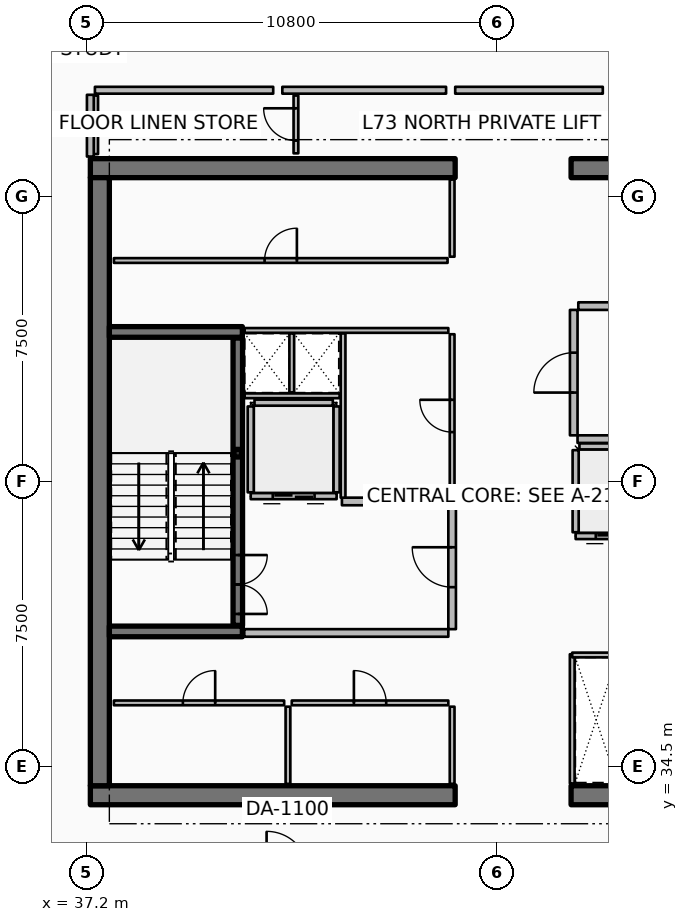
"""IFC4 building model, lengths in metres.
Left out: names, types, materials, properties, quantities, classifications, styles, units other than length and angle.
Written with IfcOpenShell. Run it as: python <this file> out.ifc"""

import sys

from ifc_helpers import new_model, si_unit, direction, frame, frame_2d, origin, origin_2d, place, context, subcontext, project, spatial, rectangle, hollow_rectangle, extrude, element, fill, save


model = new_model("IFC4")
c1 = context("Model", 3, precision=1e-05, world=origin(), true_north=direction((0.0, 1.0)))
c2 = subcontext(c1, "Body", "Model", "MODEL_VIEW")
j1 = project(units=[si_unit("LENGTHUNIT", "METRE"), si_unit("PLANEANGLEUNIT", "RADIAN")], contexts=[c1])
p1 = place(None, origin())
s1 = spatial("IfcSite", under=j1, at=p1, CompositionType="ELEMENT")
p2 = place(p1, origin())
s2 = spatial("IfcBuilding", under=s1, at=p2, CompositionType="ELEMENT")
p3 = place(p2, frame((0.0, 0.0, 290.6)))
s3 = spatial("IfcBuildingStorey", under=s2, at=p3, CompositionType="ELEMENT", Elevation=290.6)
p4 = place(p3, frame((37.3, 33.75, 0.0), z_axis=(0.0, 0.0, 1.0), x_axis=(1.0, 0.0, 0.0)))
e1 = element("IfcWall", 1, at=p4, inside=s3, PredefinedType="SHEAR", context=c2, shape_type="SweptSolid", body=[
    extrude(rectangle(XDim=9.6, YDim=0.5, at=frame_2d((4.8, 0.0))), origin(), (0.0, 0.0, 1.0), 3.85),
])
p5 = place(p3, frame((49.95, 33.75, 0.0), z_axis=(0.0, 0.0, 1.0), x_axis=(1.0, 0.0, 0.0)))
e2 = element("IfcWall", 2, at=p5, inside=s3, PredefinedType="SHEAR", context=c2, shape_type="SweptSolid", body=[
    extrude(rectangle(XDim=9.6, YDim=0.5, at=frame_2d((4.8, 0.0))), origin(), (0.0, 0.0, 1.0), 3.85),
])
p6 = place(p3, frame((37.3, 50.25, 0.0), z_axis=(0.0, 0.0, 1.0), x_axis=(1.0, 0.0, 0.0)))
e3 = element("IfcWall", 3, at=p6, inside=s3, PredefinedType="SHEAR", context=c2, shape_type="SweptSolid", body=[
    extrude(rectangle(XDim=9.6, YDim=0.5, at=frame_2d((4.8, 0.0))), origin(), (0.0, 0.0, 1.0), 3.85),
])
p7 = place(p3, frame((49.95, 50.25, 0.0), z_axis=(0.0, 0.0, 1.0), x_axis=(1.0, 0.0, 0.0)))
e4 = element("IfcWall", 4, at=p7, inside=s3, PredefinedType="SHEAR", context=c2, shape_type="SweptSolid", body=[
    extrude(rectangle(XDim=9.6, YDim=0.5, at=frame_2d((4.8, 0.0))), origin(), (0.0, 0.0, 1.0), 3.85),
])
p8 = place(p3, frame((37.55, 34.0, 0.0), z_axis=(0.0, 0.0, 1.0), x_axis=(0.0, 1.0, 0.0)))
e5 = element("IfcWall", 5, at=p8, inside=s3, PredefinedType="SHEAR", context=c2, shape_type="SweptSolid", body=[
    extrude(rectangle(XDim=16.0, YDim=0.5, at=frame_2d((8.0, 0.0))), origin(), (0.0, 0.0, 1.0), 3.85),
])
for number, where, z_axis, x_axis in (
    (6, (37.8, 38.06, 0.0), (0.0, 0.0, 1.0), (1.0, 0.0, 0.0)),
    (7, (37.8, 45.94, 0.0), (0.0, 0.0, 1.0), (1.0, 0.0, 0.0)),
):
    element("IfcWall", number, at=place(p3, frame(where, z_axis=z_axis, x_axis=x_axis)), inside=s3, PredefinedType="SHEAR", context=c2, shape_type="SweptSolid", body=[
        extrude(rectangle(XDim=3.5, YDim=0.28, at=frame_2d((1.75, 0.0))), origin(), (0.0, 0.0, 1.0), 3.85),
    ])
p9 = place(p3, frame((41.18, 42.75, 0.0), z_axis=(0.0, 0.0, 1.0), x_axis=(1.0, 0.0, 0.0)))
e8 = element("IfcColumn", 8, at=p9, inside=s3, PredefinedType="COLUMN", context=c2, shape_type="SweptSolid", body=[
    extrude(hollow_rectangle(XDim=0.2, YDim=0.2, WallThickness=0.01, InnerFilletRadius=0.01, OuterFilletRadius=0.02, at=origin_2d()), origin(), (0.0, 0.0, 1.0), 1.72),
])
p10 = place(p3, frame((41.18, 38.22, 0.0), z_axis=(0.0, 0.0, 1.0), x_axis=(0.0, 1.0, 0.0)))
e9 = element("IfcWall", 9, at=p10, inside=s3, PredefinedType="SOLIDWALL", context=c2, shape_type="SweptSolid", body=[
    extrude(rectangle(XDim=7.56, YDim=0.25, at=frame_2d((3.78, 0.0))), origin(), (0.0, 0.0, 1.0), 3.59),
])
p11 = place(p10, frame((0.3, 0.0, 0.0)))
e10 = element("IfcOpeningElement", 10, at=p11, cuts=e9, PredefinedType="OPENING", context=c2, shape_type="SweptSolid", body=[
    extrude(rectangle(XDim=1.55, YDim=2.15, at=frame_2d((0.775, 1.075))), frame((0.0, 0.135, 0.0), z_axis=(0.0, -1.0, 0.0), x_axis=(1.0, 0.0, 0.0)), (0.0, 0.0, 1.0), 0.27),
])
p12 = place(p3, frame((43.78, 41.62, 0.0), z_axis=(0.0, 0.0, 1.0), x_axis=(-1.0, 0.0, 0.0)))
e11 = element("IfcWall", 11, at=p12, inside=s3, PredefinedType="PARTITIONING", context=c2, shape_type="SweptSolid", body=[
    extrude(rectangle(XDim=2.26, YDim=0.16, at=frame_2d((1.13, 0.0))), origin(), (0.0, 0.0, 1.0), 3.59),
])
p13 = place(p12, frame((0.58, 0.0, 0.0)))
e12 = element("IfcOpeningElement", 12, at=p13, cuts=e11, PredefinedType="OPENING", context=c2, shape_type="SweptSolid", body=[
    extrude(rectangle(XDim=1.1, YDim=2.1, at=frame_2d((0.55, 1.05))), frame((0.0, 0.09, 0.0), z_axis=(0.0, -1.0, 0.0), x_axis=(1.0, 0.0, 0.0)), (0.0, 0.0, 1.0), 0.18),
])
for number, where, z_axis, x_axis in (
    (13, (43.78, 41.72, 0.0), (0.0, 0.0, 1.0), (0.0, 1.0, 0.0)),
    (14, (41.52, 41.72, 0.0), (0.0, 0.0, 1.0), (0.0, 1.0, 0.0)),
):
    element("IfcWall", number, at=place(p3, frame(where, z_axis=z_axis, x_axis=x_axis)), inside=s3, PredefinedType="PARTITIONING", context=c2, shape_type="SweptSolid", body=[
        extrude(rectangle(XDim=2.26, YDim=0.16, at=frame_2d((1.13, 0.0))), origin(), (0.0, 0.0, 1.0), 3.59),
    ])
p14 = place(p3, frame((41.62, 44.08, 0.0), z_axis=(0.0, 0.0, 1.0), x_axis=(1.0, 0.0, 0.0)))
e15 = element("IfcWall", 15, at=p14, inside=s3, PredefinedType="PARTITIONING", context=c2, shape_type="SweptSolid", body=[
    extrude(rectangle(XDim=2.06, YDim=0.16, at=frame_2d((1.03, 0.0))), origin(), (0.0, 0.0, 1.0), 3.59),
])
p15 = place(p3, frame((52.23, 40.57, 0.0), z_axis=(0.0, 0.0, 1.0), x_axis=(-1.0, 0.0, 0.0)))
e16 = element("IfcWall", 16, at=p15, inside=s3, PredefinedType="PARTITIONING", context=c2, shape_type="SweptSolid", body=[
    extrude(rectangle(XDim=2.16, YDim=0.16, at=frame_2d((1.08, 0.0))), origin(), (0.0, 0.0, 1.0), 3.59),
])
p16 = place(p15, frame((0.53, 0.0, 0.0)))
e17 = element("IfcOpeningElement", 17, at=p16, cuts=e16, PredefinedType="OPENING", context=c2, shape_type="SweptSolid", body=[
    extrude(rectangle(XDim=1.1, YDim=2.1, at=frame_2d((0.55, 1.05))), frame((0.0, 0.09, 0.0), z_axis=(0.0, -1.0, 0.0), x_axis=(1.0, 0.0, 0.0)), (0.0, 0.0, 1.0), 0.18),
])
p17 = place(p3, frame((50.07, 40.67, 0.0), z_axis=(0.0, 0.0, 1.0), x_axis=(0.0, 1.0, 0.0)))
e18 = element("IfcWall", 18, at=p17, inside=s3, PredefinedType="PARTITIONING", context=c2, shape_type="SweptSolid", body=[
    extrude(rectangle(XDim=2.16, YDim=0.16, at=frame_2d((1.08, 0.0))), origin(), (0.0, 0.0, 1.0), 3.59),
])
p18 = place(p3, frame((50.17, 42.93, 0.0), z_axis=(0.0, 0.0, 1.0), x_axis=(1.0, 0.0, 0.0)))
e19 = element("IfcWall", 19, at=p18, inside=s3, PredefinedType="PARTITIONING", context=c2, shape_type="SweptSolid", body=[
    extrude(rectangle(XDim=1.96, YDim=0.16, at=frame_2d((0.98, 0.0))), origin(), (0.0, 0.0, 1.0), 3.59),
])
for number, where, z_axis, x_axis in (
    (20, (46.82, 34.05, 0.0), (0.0, 0.0, 1.0), (0.0, 1.0, 0.0)),
    (21, (42.5, 34.05, 0.0), (0.0, 0.0, 1.0), (0.0, 1.0, 0.0)),
):
    element("IfcWall", number, at=place(p3, frame(where, z_axis=z_axis, x_axis=x_axis)), inside=s3, PredefinedType="PARTITIONING", context=c2, shape_type="SweptSolid", body=[
        extrude(rectangle(XDim=2.03, YDim=0.125, at=frame_2d((1.015, 0.0))), origin(), (0.0, 0.0, 1.0), 3.03),
    ])
p19 = place(p3, frame((37.92, 36.18, 0.0), z_axis=(0.0, 0.0, 1.0), x_axis=(1.0, 0.0, 0.0)))
e22 = element("IfcWall", 22, at=p19, inside=s3, PredefinedType="PARTITIONING", context=c2, shape_type="SweptSolid", body=[
    extrude(rectangle(XDim=4.48, YDim=0.125, at=frame_2d((2.24, 0.0))), origin(), (0.0, 0.0, 1.0), 3.03),
])
p20 = place(p19, frame((1.815, 0.0, 0.0)))
e23 = element("IfcOpeningElement", 23, at=p20, cuts=e22, PredefinedType="OPENING", context=c2, shape_type="SweptSolid", body=[
    extrude(rectangle(XDim=0.85, YDim=2.06, at=frame_2d((0.425, 1.03))), frame((0.0, 0.073, 0.0), z_axis=(0.0, -1.0, 0.0), x_axis=(1.0, 0.0, 0.0)), (0.0, 0.0, 1.0), 0.145),
])
p21 = place(p3, frame((42.6, 36.18, 0.0), z_axis=(0.0, 0.0, 1.0), x_axis=(1.0, 0.0, 0.0)))
e24 = element("IfcWall", 24, at=p21, inside=s3, PredefinedType="PARTITIONING", context=c2, shape_type="SweptSolid", body=[
    extrude(rectangle(XDim=4.12, YDim=0.125, at=frame_2d((2.06, 0.0))), origin(), (0.0, 0.0, 1.0), 3.03),
])
p22 = place(p21, frame((1.635, 0.0, 0.0)))
e25 = element("IfcOpeningElement", 25, at=p22, cuts=e24, PredefinedType="OPENING", context=c2, shape_type="SweptSolid", body=[
    extrude(rectangle(XDim=0.85, YDim=2.06, at=frame_2d((0.425, 1.03))), frame((0.0, 0.073, 0.0), z_axis=(0.0, -1.0, 0.0), x_axis=(1.0, 0.0, 0.0)), (0.0, 0.0, 1.0), 0.145),
])
p23 = place(p3, frame((46.82, 47.92, 0.0), z_axis=(0.0, 0.0, 1.0), x_axis=(0.0, 1.0, 0.0)))
e26 = element("IfcWall", 26, at=p23, inside=s3, PredefinedType="PARTITIONING", context=c2, shape_type="SweptSolid", body=[
    extrude(rectangle(XDim=2.03, YDim=0.125, at=frame_2d((1.015, 0.0))), origin(), (0.0, 0.0, 1.0), 3.03),
])
p24 = place(p3, frame((37.92, 47.82, 0.0), z_axis=(0.0, 0.0, 1.0), x_axis=(1.0, 0.0, 0.0)))
e27 = element("IfcWall", 27, at=p24, inside=s3, PredefinedType="PARTITIONING", context=c2, shape_type="SweptSolid", body=[
    extrude(rectangle(XDim=8.78, YDim=0.125, at=frame_2d((4.39, 0.0))), origin(), (0.0, 0.0, 1.0), 3.03),
])
p25 = place(p24, frame((3.965, 0.0, 0.0)))
e28 = element("IfcOpeningElement", 28, at=p25, cuts=e27, PredefinedType="OPENING", context=c2, shape_type="SweptSolid", body=[
    extrude(rectangle(XDim=0.85, YDim=2.06, at=frame_2d((0.425, 1.03))), frame((0.0, 0.073, 0.0), z_axis=(0.0, -1.0, 0.0), x_axis=(1.0, 0.0, 0.0)), (0.0, 0.0, 1.0), 0.145),
])
p26 = place(p3, frame((41.35, 38.02, 0.0), z_axis=(0.0, 0.0, 1.0), x_axis=(1.0, 0.0, 0.0)))
e29 = element("IfcWall", 29, at=p26, inside=s3, PredefinedType="PARTITIONING", context=c2, shape_type="SweptSolid", body=[
    extrude(rectangle(XDim=5.37, YDim=0.2, at=frame_2d((2.685, 0.0))), origin(), (0.0, 0.0, 1.0), 3.59),
])
p27 = place(p3, frame((43.92, 41.48, 0.0), z_axis=(0.0, 0.0, 1.0), x_axis=(1.0, 0.0, 0.0)))
e30 = element("IfcWall", 30, at=p27, inside=s3, PredefinedType="PARTITIONING", context=c2, shape_type="SweptSolid", body=[
    extrude(rectangle(XDim=2.8, YDim=0.2, at=frame_2d((1.4, 0.0))), origin(), (0.0, 0.0, 1.0), 3.59),
])
p28 = place(p3, frame((46.82, 38.12, 0.0), z_axis=(0.0, 0.0, 1.0), x_axis=(0.0, 1.0, 0.0)))
e31 = element("IfcWall", 31, at=p28, inside=s3, PredefinedType="PARTITIONING", context=c2, shape_type="SweptSolid", body=[
    extrude(rectangle(XDim=3.26, YDim=0.2, at=frame_2d((1.63, 0.0))), origin(), (0.0, 0.0, 1.0), 3.59),
])
p29 = place(p28, frame((1.105, 0.0, 0.0)))
e32 = element("IfcOpeningElement", 32, at=p29, cuts=e31, PredefinedType="OPENING", context=c2, shape_type="SweptSolid", body=[
    extrude(rectangle(XDim=1.05, YDim=2.1, at=frame_2d((0.525, 1.05))), frame((0.0, 0.11, 0.0), z_axis=(0.0, -1.0, 0.0), x_axis=(1.0, 0.0, 0.0)), (0.0, 0.0, 1.0), 0.22),
])
p30 = place(p3, frame((50.12, 43.12, 0.0), z_axis=(0.0, 0.0, 1.0), x_axis=(1.0, 0.0, 0.0)))
e33 = element("IfcWall", 33, at=p30, inside=s3, PredefinedType="PARTITIONING", context=c2, shape_type="SweptSolid", body=[
    extrude(rectangle(XDim=8.88, YDim=0.2, at=frame_2d((4.44, 0.0))), origin(), (0.0, 0.0, 1.0), 3.59),
])
p31 = place(p3, frame((50.14, 46.62, 0.0), z_axis=(0.0, 0.0, 1.0), x_axis=(1.0, 0.0, 0.0)))
e34 = element("IfcWall", 34, at=p31, inside=s3, PredefinedType="PARTITIONING", context=c2, shape_type="SweptSolid", body=[
    extrude(rectangle(XDim=1.02, YDim=0.2, at=frame_2d((0.51, 0.0))), origin(), (0.0, 0.0, 1.0), 3.59),
])
p32 = place(p3, frame((50.02, 43.22, 0.0), z_axis=(0.0, 0.0, 1.0), x_axis=(0.0, 1.0, 0.0)))
e35 = element("IfcWall", 35, at=p32, inside=s3, PredefinedType="PARTITIONING", context=c2, shape_type="SweptSolid", body=[
    extrude(rectangle(XDim=3.3, YDim=0.2, at=frame_2d((1.65, 0.0))), origin(), (0.0, 0.0, 1.0), 3.59),
])
p33 = place(p32, frame((1.125, 0.0, 0.0)))
e36 = element("IfcOpeningElement", 36, at=p33, cuts=e35, PredefinedType="OPENING", context=c2, shape_type="SweptSolid", body=[
    extrude(rectangle(XDim=1.05, YDim=2.1, at=frame_2d((0.525, 1.05))), frame((0.0, 0.11, 0.0), z_axis=(0.0, -1.0, 0.0), x_axis=(1.0, 0.0, 0.0)), (0.0, 0.0, 1.0), 0.22),
])
p34 = place(p3, frame((41.36, 45.98, 0.0), z_axis=(0.0, 0.0, 1.0), x_axis=(1.0, 0.0, 0.0)))
e37 = element("IfcWall", 37, at=p34, inside=s3, PredefinedType="PARTITIONING", context=c2, shape_type="SweptSolid", body=[
    extrude(rectangle(XDim=5.36, YDim=0.125, at=frame_2d((2.68, 0.0))), origin(), (0.0, 0.0, 1.0), 3.03),
])
p35 = place(p3, frame((41.36, 44.26, 0.0), z_axis=(0.0, 0.0, 1.0), x_axis=(1.0, 0.0, 0.0)))
e38 = element("IfcWall", 38, at=p35, inside=s3, PredefinedType="PARTITIONING", context=c2, shape_type="SweptSolid", body=[
    extrude(rectangle(XDim=2.5, YDim=0.125, at=frame_2d((1.25, 0.0))), origin(), (0.0, 0.0, 1.0), 3.03),
])
p36 = place(p3, frame((42.6, 44.35, 0.0), z_axis=(0.0, 0.0, 1.0), x_axis=(0.0, 1.0, 0.0)))
e39 = element("IfcWall", 39, at=p36, inside=s3, PredefinedType="PARTITIONING", context=c2, shape_type="SweptSolid", body=[
    extrude(rectangle(XDim=1.55, YDim=0.125, at=frame_2d((0.775, 0.0))), origin(), (0.0, 0.0, 1.0), 3.03),
])
p37 = place(p3, frame((49.98, 34.06, 0.0), z_axis=(0.0, 0.0, 1.0), x_axis=(0.0, 1.0, 0.0)))
e40 = element("IfcWall", 40, at=p37, inside=s3, PredefinedType="PARTITIONING", context=c2, shape_type="SweptSolid", body=[
    extrude(rectangle(XDim=3.4, YDim=0.125, at=frame_2d((1.7, 0.0))), origin(), (0.0, 0.0, 1.0), 3.03),
])
p38 = place(p3, frame((49.98, 37.44, 0.0), z_axis=(0.0, 0.0, 1.0), x_axis=(1.0, 0.0, 0.0)))
e41 = element("IfcWall", 41, at=p38, inside=s3, PredefinedType="PARTITIONING", context=c2, shape_type="SweptSolid", body=[
    extrude(rectangle(XDim=1.26, YDim=0.125, at=frame_2d((0.63, 0.0))), origin(), (0.0, 0.0, 1.0), 3.03),
])
p39 = place(p3, frame((43.95, 41.58, 0.0), z_axis=(0.0, 0.0, 1.0), x_axis=(0.0, 1.0, 0.0)))
e42 = element("IfcWall", 42, at=p39, inside=s3, PredefinedType="PARTITIONING", context=c2, shape_type="SweptSolid", body=[
    extrude(rectangle(XDim=4.32, YDim=0.125, at=frame_2d((2.16, 0.0))), origin(), (0.0, 0.0, 1.0), 3.03),
])
p40 = place(p3, frame((46.82, 41.58, 0.0), z_axis=(0.0, 0.0, 1.0), x_axis=(0.0, 1.0, 0.0)))
e43 = element("IfcWall", 43, at=p40, inside=s3, PredefinedType="PARTITIONING", context=c2, shape_type="SweptSolid", body=[
    extrude(rectangle(XDim=4.3, YDim=0.125, at=frame_2d((2.15, 0.0))), origin(), (0.0, 0.0, 1.0), 3.03),
])
p41 = place(p40, frame((1.725, 0.0, 0.0)))
e44 = element("IfcOpeningElement", 44, at=p41, cuts=e43, PredefinedType="OPENING", context=c2, shape_type="SweptSolid", body=[
    extrude(rectangle(XDim=0.85, YDim=2.06, at=frame_2d((0.425, 1.03))), frame((0.0, 0.073, 0.0), z_axis=(0.0, -1.0, 0.0), x_axis=(1.0, 0.0, 0.0)), (0.0, 0.0, 1.0), 0.145),
])
p42 = place(p3, frame((37.44, 50.62, 0.0), z_axis=(0.0, 0.0, 1.0), x_axis=(0.0, 1.0, 0.0)))
e45 = element("IfcWall", 45, at=p42, inside=s3, PredefinedType="PARTITIONING", context=c2, shape_type="SweptSolid", body=[
    extrude(rectangle(XDim=1.54, YDim=0.125, at=frame_2d((0.77, 0.0))), origin(), (0.0, 0.0, 1.0), 3.03),
])
p43 = place(p3, frame((42.71, 50.64, 0.0), z_axis=(0.0, 0.0, 1.0), x_axis=(0.0, 1.0, 0.0)))
e46 = element("IfcWall", 46, at=p43, inside=s3, PredefinedType="PARTITIONING", context=c2, shape_type="SweptSolid", body=[
    extrude(rectangle(XDim=1.52, YDim=0.125, at=frame_2d((0.76, 0.0))), origin(), (0.0, 0.0, 1.0), 2.957),
])
p44 = place(p43, frame((0.335, 0.0, 0.0)))
e47 = element("IfcOpeningElement", 47, at=p44, cuts=e46, PredefinedType="OPENING", context=c2, shape_type="SweptSolid", body=[
    extrude(rectangle(XDim=0.85, YDim=2.06, at=frame_2d((0.425, 1.03))), frame((0.0, 0.073, 0.0), z_axis=(0.0, -1.0, 0.0), x_axis=(1.0, 0.0, 0.0)), (0.0, 0.0, 1.0), 0.145),
])
p45 = place(p3, frame((50.785, 52.3, 0.0), z_axis=(0.0, 0.0, 1.0), x_axis=(-1.0, 0.0, 0.0)))
e48 = element("IfcWall", 48, at=p45, inside=s3, PredefinedType="PARTITIONING", context=c2, shape_type="SweptSolid", body=[
    extrude(rectangle(XDim=3.884, YDim=0.18, at=frame_2d((1.942, 0.0))), origin(), (0.0, 0.0, 1.0), 2.957),
])
p46 = place(p3, frame((46.661, 52.3, 0.0), z_axis=(0.0, 0.0, 1.0), x_axis=(-1.0, 0.0, 0.0)))
e49 = element("IfcWall", 49, at=p46, inside=s3, PredefinedType="PARTITIONING", context=c2, shape_type="SweptSolid", body=[
    extrude(rectangle(XDim=4.309, YDim=0.18, at=frame_2d((2.155, 0.0))), origin(), (0.0, 0.0, 1.0), 2.957),
])
p47 = place(p3, frame((42.112, 52.3, 0.0), z_axis=(0.0, 0.0, 1.0), x_axis=(-1.0, 0.0, 0.0)))
e50 = element("IfcWall", 50, at=p47, inside=s3, PredefinedType="PARTITIONING", context=c2, shape_type="SweptSolid", body=[
    extrude(rectangle(XDim=4.692, YDim=0.18, at=frame_2d((2.346, 0.0))), origin(), (0.0, 0.0, 1.0), 2.957),
])
p48 = place(p3, frame((37.3, 52.18, 0.0), z_axis=(0.0, 0.0, 1.0), x_axis=(0.0, -1.0, 0.0)))
e51 = element("IfcWall", 51, at=p48, inside=s3, PredefinedType="PARTITIONING", context=c2, shape_type="SweptSolid", body=[
    extrude(rectangle(XDim=1.625, YDim=0.18, at=frame_2d((0.812, 0.0))), origin(), (0.0, 0.0, 1.0), 2.957),
])
p49 = place(p3, frame((39.536, 56.894, 0.0), z_axis=(0.0, 0.0, 1.0), x_axis=(-0.760410931944, -0.649442233443, 0.0)))
e52 = element("IfcWall", 52, at=p49, inside=s3, PredefinedType="PARTITIONING", context=c2, shape_type="SweptSolid", body=[
    extrude(rectangle(XDim=6.473, YDim=0.125, at=frame_2d((3.236, 0.0))), origin(), (0.0, 0.0, 1.0), 2.957),
])
p50 = place(p49, frame((2.786, 0.0, 0.0)))
e53 = element("IfcOpeningElement", 53, at=p50, cuts=e52, PredefinedType="OPENING", context=c2, shape_type="SweptSolid", body=[
    extrude(rectangle(XDim=0.9, YDim=2.08, at=frame_2d((0.45, 1.04))), frame((0.0, 0.073, 0.0), z_axis=(0.0, -1.0, 0.0), x_axis=(1.0, 0.0, 0.0)), (0.0, 0.0, 1.0), 0.145),
])
p51 = place(p11, origin())
e54 = element("IfcDoor", 54, at=p51, inside=s3, OperationType="DOUBLE_DOOR_SINGLE_SWING", PredefinedType="DOOR", context=c2, shape_type="SweptSolid", body=[
    extrude(rectangle(XDim=1.55, YDim=2.15, at=frame_2d((0.775, 1.075))), frame((0.0, 0.025, 0.0), z_axis=(0.0, -1.0, 0.0), x_axis=(1.0, 0.0, 0.0)), (0.0, 0.0, 1.0), 0.05),
])
fill(e10, e54)
p52 = place(p13, origin())
e55 = element("IfcDoor", 55, at=p52, inside=s3, OperationType="DOUBLE_DOOR_SLIDING", PredefinedType="DOOR", context=c2, shape_type="SweptSolid", body=[
    extrude(rectangle(XDim=1.1, YDim=2.1, at=frame_2d((0.55, 1.05))), frame((0.0, 0.025, 0.0), z_axis=(0.0, -1.0, 0.0), x_axis=(1.0, 0.0, 0.0)), (0.0, 0.0, 1.0), 0.05),
])
fill(e12, e55)
p53 = place(p16, origin())
e56 = element("IfcDoor", 56, at=p53, inside=s3, OperationType="DOUBLE_DOOR_SLIDING", PredefinedType="DOOR", context=c2, shape_type="SweptSolid", body=[
    extrude(rectangle(XDim=1.1, YDim=2.1, at=frame_2d((0.55, 1.05))), frame((0.0, 0.025, 0.0), z_axis=(0.0, -1.0, 0.0), x_axis=(1.0, 0.0, 0.0)), (0.0, 0.0, 1.0), 0.05),
])
fill(e17, e56)
p54 = place(p20, origin())
e57 = element("IfcDoor", 57, at=p54, inside=s3, OperationType="SINGLE_SWING_RIGHT", PredefinedType="DOOR", context=c2, shape_type="SweptSolid", body=[
    extrude(rectangle(XDim=0.85, YDim=2.06, at=frame_2d((0.425, 1.03))), frame((0.0, 0.025, 0.0), z_axis=(0.0, -1.0, 0.0), x_axis=(1.0, 0.0, 0.0)), (0.0, 0.0, 1.0), 0.05),
])
fill(e23, e57)
p55 = place(p22, origin())
e58 = element("IfcDoor", 58, at=p55, inside=s3, OperationType="SINGLE_SWING_LEFT", PredefinedType="DOOR", context=c2, shape_type="SweptSolid", body=[
    extrude(rectangle(XDim=0.85, YDim=2.06, at=frame_2d((0.425, 1.03))), frame((0.0, 0.025, 0.0), z_axis=(0.0, -1.0, 0.0), x_axis=(1.0, 0.0, 0.0)), (0.0, 0.0, 1.0), 0.05),
])
fill(e25, e58)
p56 = place(p25, origin())
e59 = element("IfcDoor", 59, at=p56, inside=s3, OperationType="SINGLE_SWING_RIGHT", PredefinedType="DOOR", context=c2, shape_type="SweptSolid", body=[
    extrude(rectangle(XDim=0.85, YDim=2.06, at=frame_2d((0.425, 1.03))), frame((0.0, 0.025, 0.0), z_axis=(0.0, -1.0, 0.0), x_axis=(1.0, 0.0, 0.0)), (0.0, 0.0, 1.0), 0.05),
])
fill(e28, e59)
p57 = place(p29, origin())
e60 = element("IfcDoor", 60, at=p57, inside=s3, OperationType="SINGLE_SWING_RIGHT", PredefinedType="DOOR", context=c2, shape_type="SweptSolid", body=[
    extrude(rectangle(XDim=1.05, YDim=2.1, at=frame_2d((0.525, 1.05))), frame((0.0, 0.025, 0.0), z_axis=(0.0, -1.0, 0.0), x_axis=(1.0, 0.0, 0.0)), (0.0, 0.0, 1.0), 0.05),
])
fill(e32, e60)
p58 = place(p33, origin())
e61 = element("IfcDoor", 61, at=p58, inside=s3, OperationType="SINGLE_SWING_LEFT", PredefinedType="DOOR", context=c2, shape_type="SweptSolid", body=[
    extrude(rectangle(XDim=1.05, YDim=2.1, at=frame_2d((0.525, 1.05))), frame((0.0, 0.025, 0.0), z_axis=(0.0, -1.0, 0.0), x_axis=(1.0, 0.0, 0.0)), (0.0, 0.0, 1.0), 0.05),
])
fill(e36, e61)
p59 = place(p41, origin())
e62 = element("IfcDoor", 62, at=p59, inside=s3, OperationType="SINGLE_SWING_RIGHT", PredefinedType="DOOR", context=c2, shape_type="SweptSolid", body=[
    extrude(rectangle(XDim=0.85, YDim=2.06, at=frame_2d((0.425, 1.03))), frame((0.0, 0.025, 0.0), z_axis=(0.0, -1.0, 0.0), x_axis=(1.0, 0.0, 0.0)), (0.0, 0.0, 1.0), 0.05),
])
fill(e44, e62)
p60 = place(p44, origin())
e63 = element("IfcDoor", 63, at=p60, inside=s3, OperationType="SINGLE_SWING_RIGHT", PredefinedType="DOOR", context=c2, shape_type="SweptSolid", body=[
    extrude(rectangle(XDim=0.85, YDim=2.06, at=frame_2d((0.425, 1.03))), frame((0.0, 0.025, 0.0), z_axis=(0.0, -1.0, 0.0), x_axis=(1.0, 0.0, 0.0)), (0.0, 0.0, 1.0), 0.05),
])
fill(e47, e63)
save(model, sys.argv[1])
